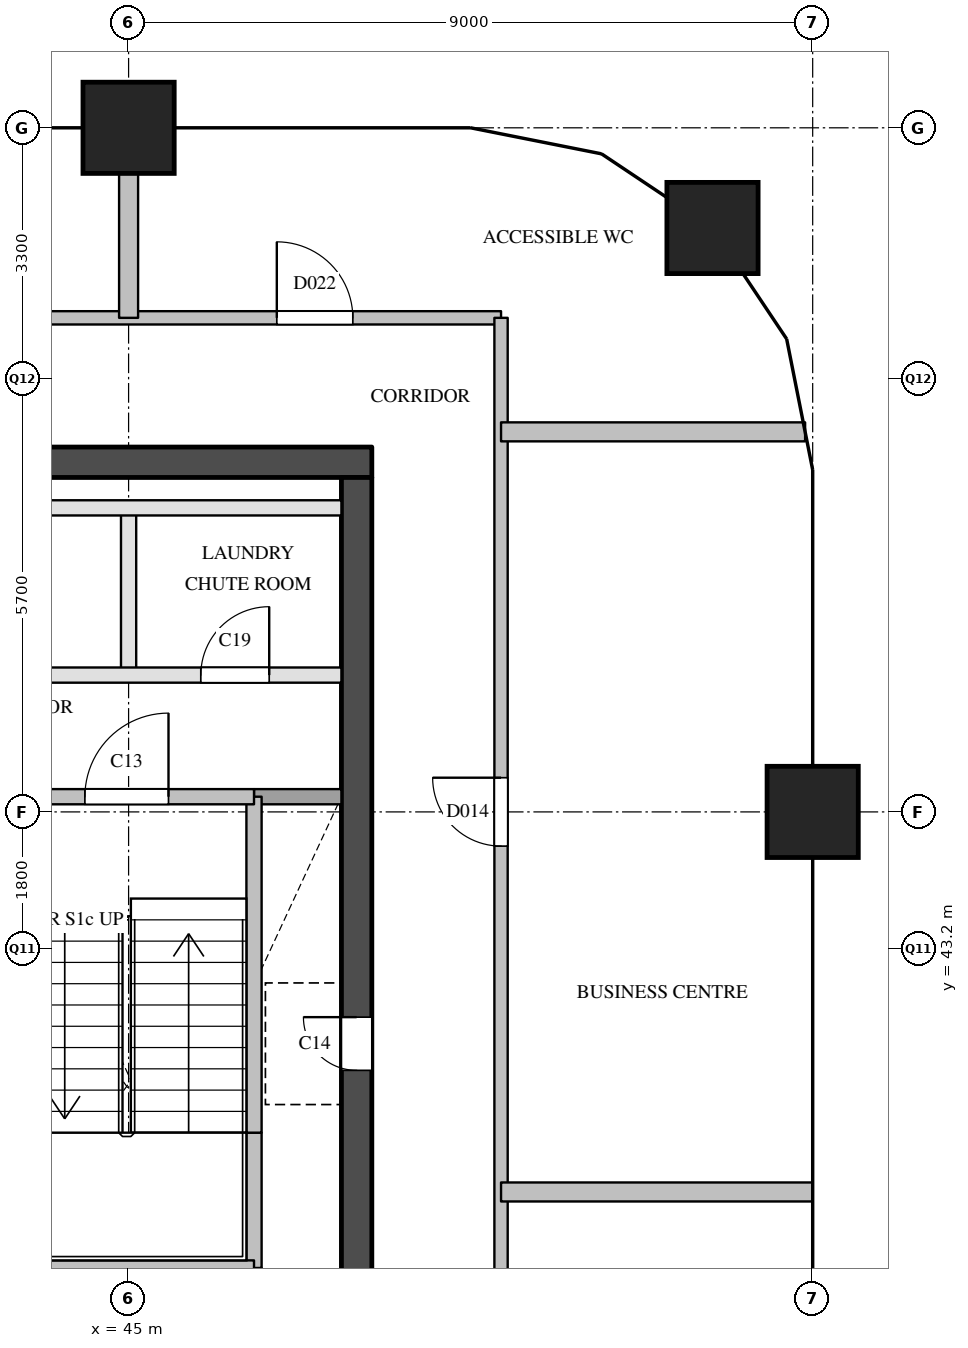
"""IFC4 building model, lengths in metres.
Left out: names, types, materials, properties, quantities, classifications, styles, units other than length and angle.
Written with IfcOpenShell. Run it as: python <this file> out.ifc"""

import sys

from ifc_helpers import new_model, si_unit, direction, frame, frame_2d, origin, origin_2d, place, context, subcontext, project, spatial, rectangle, extrude, element, fill, save


model = new_model("IFC4")
c1 = context("Model", 3, precision=1e-05, world=origin(), true_north=direction((0.0, 1.0)))
c2 = subcontext(c1, "Body", "Model", "MODEL_VIEW")
j1 = project(units=[si_unit("LENGTHUNIT", "METRE"), si_unit("PLANEANGLEUNIT", "RADIAN")], contexts=[c1])
p1 = place(None, origin())
s1 = spatial("IfcSite", under=j1, at=p1, CompositionType="ELEMENT")
p2 = place(p1, origin())
s2 = spatial("IfcBuilding", under=s1, at=p2, CompositionType="ELEMENT")
p3 = place(p2, frame((0.0, 0.0, 238.4)))
s3 = spatial("IfcBuildingStorey", under=s2, at=p3, CompositionType="ELEMENT", Elevation=238.4)
for number, where, z_axis, x_axis in (
    (1, (45.0, 54.0, 0.0), (0.0, 0.0, 1.0), (1.0, 0.0, 0.0)),
    (2, (54.0, 45.0, 0.0), (0.0, 0.0, 1.0), (1.0, 0.0, 0.0)),
    (3, (52.682, 52.682, 0.0), (0.0, 0.0, 1.0), (1.0, 0.0, 0.0)),
):
    element("IfcColumn", number, at=place(p3, frame(where, z_axis=z_axis, x_axis=x_axis)), inside=s3, PredefinedType="COLUMN", context=c2, shape_type="SweptSolid", body=[
        extrude(rectangle(XDim=1.2, YDim=1.2, at=origin_2d()), origin(), (0.0, 0.0, 1.0), 3.9),
    ])
p4 = place(p3, frame((36.2, 49.6, 0.0), z_axis=(0.0, 0.0, 1.0), x_axis=(1.0, 0.0, 0.0)))
e4 = element("IfcWall", 4, at=p4, inside=s3, PredefinedType="SHEAR", context=c2, shape_type="SweptSolid", body=[
    extrude(rectangle(XDim=12.0, YDim=0.4, at=frame_2d((6.0, 0.0))), origin(), (0.0, 0.0, 1.0), 3.6),
])
p5 = place(p3, frame((48.0, 29.1, 0.0), z_axis=(0.0, 0.0, 1.0), x_axis=(0.0, 1.0, 0.0)))
e5 = element("IfcWall", 5, at=p5, inside=s3, PredefinedType="SHEAR", context=c2, shape_type="SweptSolid", body=[
    extrude(rectangle(XDim=20.3, YDim=0.4, at=frame_2d((10.15, 0.0))), origin(), (0.0, 0.0, 1.0), 3.6),
])
p6 = place(p5, frame((12.5, 0.0, 0.0)))
e6 = element("IfcOpeningElement", 6, at=p6, cuts=e5, PredefinedType="OPENING", context=c2, shape_type="SweptSolid", body=[
    extrude(rectangle(XDim=0.7, YDim=2.1, at=frame_2d((0.35, 1.05))), frame((0.0, 0.21, 0.0), z_axis=(0.0, -1.0, 0.0), x_axis=(1.0, 0.0, 0.0)), (0.0, 0.0, 1.0), 0.42),
])
p7 = place(p5, frame((3.9, 0.0, 0.0)))
e7 = element("IfcOpeningElement", 7, at=p7, cuts=e5, PredefinedType="OPENING", context=c2, shape_type="SweptSolid", body=[
    extrude(rectangle(XDim=1.8, YDim=2.1, at=frame_2d((0.9, 1.05))), frame((0.0, 0.21, 0.0), z_axis=(0.0, -1.0, 0.0), x_axis=(1.0, 0.0, 0.0)), (0.0, 0.0, 1.0), 0.42),
])
p8 = place(p3, frame((45.0, 46.8, 0.0), z_axis=(0.0, 0.0, 1.0), x_axis=(0.0, 1.0, 0.0)))
e8 = element("IfcWall", 8, at=p8, inside=s3, PredefinedType="PARTITIONING", context=c2, shape_type="SweptSolid", body=[
    extrude(rectangle(XDim=2.2, YDim=0.2, at=frame_2d((1.1, 0.0))), origin(), (0.0, 0.0, 1.0), 3.6),
])
p9 = place(p3, frame((46.65, 39.0, 0.0), z_axis=(0.0, 0.0, 1.0), x_axis=(0.0, 1.0, 0.0)))
e9 = element("IfcWall", 9, at=p9, inside=s3, PredefinedType="SOLIDWALL", context=c2, shape_type="SweptSolid", body=[
    extrude(rectangle(XDim=1.78, YDim=0.2, at=frame_2d((0.89, 0.0))), origin(), (0.0, 0.0, 1.0), 3.6),
])
p10 = place(p3, frame((46.65, 40.78, 0.0), z_axis=(0.0, 0.0, 1.0), x_axis=(0.0, 1.0, 0.0)))
e10 = element("IfcWall", 10, at=p10, inside=s3, PredefinedType="SOLIDWALL", context=c2, shape_type="SweptSolid", body=[
    extrude(rectangle(XDim=4.42, YDim=0.2, at=frame_2d((2.21, 0.0))), origin(), (0.0, 0.0, 1.0), 3.6),
])
p11 = place(p3, frame((43.4, 39.0, 0.0), z_axis=(0.0, 0.0, 1.0), x_axis=(1.0, 0.0, 0.0)))
e11 = element("IfcWall", 11, at=p11, inside=s3, PredefinedType="SOLIDWALL", context=c2, shape_type="SweptSolid", body=[
    extrude(rectangle(XDim=3.25, YDim=0.2, at=frame_2d((1.625, 0.0))), origin(), (0.0, 0.0, 1.0), 3.6),
])
p12 = place(p3, frame((46.65, 45.2, 0.0), z_axis=(0.0, 0.0, 1.0), x_axis=(1.0, 0.0, 0.0)))
e12 = element("IfcWall", 12, at=p12, inside=s3, PredefinedType="SOLIDWALL", context=c2, shape_type="SweptSolid", body=[
    extrude(rectangle(XDim=1.15, YDim=0.2, at=frame_2d((0.575, 0.0))), origin(), (0.0, 0.0, 1.0), 3.6),
])
p13 = place(p3, frame((36.6, 45.2, 0.0), z_axis=(0.0, 0.0, 1.0), x_axis=(1.0, 0.0, 0.0)))
e13 = element("IfcWall", 13, at=p13, inside=s3, PredefinedType="SOLIDWALL", context=c2, shape_type="SweptSolid", body=[
    extrude(rectangle(XDim=10.05, YDim=0.2, at=frame_2d((5.025, 0.0))), origin(), (0.0, 0.0, 1.0), 3.6),
])
p14 = place(p13, frame((1.125, 0.0, 0.0)))
e14 = element("IfcOpeningElement", 14, at=p14, cuts=e13, PredefinedType="OPENING", context=c2, shape_type="SweptSolid", body=[
    extrude(rectangle(XDim=1.1, YDim=2.1, at=frame_2d((0.55, 1.05))), frame((0.0, 0.11, 0.0), z_axis=(0.0, -1.0, 0.0), x_axis=(1.0, 0.0, 0.0)), (0.0, 0.0, 1.0), 0.22),
])
p15 = place(p13, frame((4.475, 0.0, 0.0)))
e15 = element("IfcOpeningElement", 15, at=p15, cuts=e13, PredefinedType="OPENING", context=c2, shape_type="SweptSolid", body=[
    extrude(rectangle(XDim=1.1, YDim=2.1, at=frame_2d((0.55, 1.05))), frame((0.0, 0.11, 0.0), z_axis=(0.0, -1.0, 0.0), x_axis=(1.0, 0.0, 0.0)), (0.0, 0.0, 1.0), 0.22),
])
p16 = place(p13, frame((7.825, 0.0, 0.0)))
e16 = element("IfcOpeningElement", 16, at=p16, cuts=e13, PredefinedType="OPENING", context=c2, shape_type="SweptSolid", body=[
    extrude(rectangle(XDim=1.1, YDim=2.1, at=frame_2d((0.55, 1.05))), frame((0.0, 0.11, 0.0), z_axis=(0.0, -1.0, 0.0), x_axis=(1.0, 0.0, 0.0)), (0.0, 0.0, 1.0), 0.22),
])
p17 = place(p3, frame((36.6, 46.8, 0.0), z_axis=(0.0, 0.0, 1.0), x_axis=(1.0, 0.0, 0.0)))
e17 = element("IfcWall", 17, at=p17, inside=s3, PredefinedType="PARTITIONING", context=c2, shape_type="SweptSolid", body=[
    extrude(rectangle(XDim=11.2, YDim=0.2, at=frame_2d((5.6, 0.0))), origin(), (0.0, 0.0, 1.0), 3.6),
])
p18 = place(p17, frame((3.75, 0.0, 0.0)))
e18 = element("IfcOpeningElement", 18, at=p18, cuts=e17, PredefinedType="OPENING", context=c2, shape_type="SweptSolid", body=[
    extrude(rectangle(XDim=0.9, YDim=2.1, at=frame_2d((0.45, 1.05))), frame((0.0, 0.11, 0.0), z_axis=(0.0, -1.0, 0.0), x_axis=(1.0, 0.0, 0.0)), (0.0, 0.0, 1.0), 0.22),
])
p19 = place(p17, frame((9.35, 0.0, 0.0)))
e19 = element("IfcOpeningElement", 19, at=p19, cuts=e17, PredefinedType="OPENING", context=c2, shape_type="SweptSolid", body=[
    extrude(rectangle(XDim=0.9, YDim=2.1, at=frame_2d((0.45, 1.05))), frame((0.0, 0.11, 0.0), z_axis=(0.0, -1.0, 0.0), x_axis=(1.0, 0.0, 0.0)), (0.0, 0.0, 1.0), 0.22),
])
p20 = place(p3, frame((36.6, 49.0, 0.0), z_axis=(0.0, 0.0, 1.0), x_axis=(1.0, 0.0, 0.0)))
e20 = element("IfcWall", 20, at=p20, inside=s3, PredefinedType="PARTITIONING", context=c2, shape_type="SweptSolid", body=[
    extrude(rectangle(XDim=11.2, YDim=0.2, at=frame_2d((5.6, 0.0))), origin(), (0.0, 0.0, 1.0), 3.6),
])
p21 = place(p3, frame((34.5, 51.5, 0.0), z_axis=(0.0, 0.0, 1.0), x_axis=(1.0, 0.0, 0.0)))
e21 = element("IfcWall", 21, at=p21, inside=s3, PredefinedType="PARTITIONING", context=c2, shape_type="SweptSolid", body=[
    extrude(rectangle(XDim=15.4, YDim=0.175, at=frame_2d((7.7, 0.0))), origin(), (0.0, 0.0, 1.0), 3.6),
])
p22 = place(p21, frame((12.45, 0.0, 0.0)))
e22 = element("IfcOpeningElement", 22, at=p22, cuts=e21, PredefinedType="OPENING", context=c2, shape_type="SweptSolid", body=[
    extrude(rectangle(XDim=1.0, YDim=2.1, at=frame_2d((0.5, 1.05))), frame((0.0, 0.097, 0.0), z_axis=(0.0, -1.0, 0.0), x_axis=(1.0, 0.0, 0.0)), (0.0, 0.0, 1.0), 0.195),
])
p23 = place(p21, frame((5.05, 0.0, 0.0)))
e23 = element("IfcOpeningElement", 23, at=p23, cuts=e21, PredefinedType="OPENING", context=c2, shape_type="SweptSolid", body=[
    extrude(rectangle(XDim=0.9, YDim=2.1, at=frame_2d((0.45, 1.05))), frame((0.0, 0.097, 0.0), z_axis=(0.0, -1.0, 0.0), x_axis=(1.0, 0.0, 0.0)), (0.0, 0.0, 1.0), 0.195),
])
p24 = place(p3, frame((49.9, 28.5, 0.0), z_axis=(0.0, 0.0, 1.0), x_axis=(0.0, 1.0, 0.0)))
e24 = element("IfcWall", 24, at=p24, inside=s3, PredefinedType="PARTITIONING", context=c2, shape_type="SweptSolid", body=[
    extrude(rectangle(XDim=23.0, YDim=0.175, at=frame_2d((11.5, 0.0))), origin(), (0.0, 0.0, 1.0), 3.6),
])
p25 = place(p24, frame((5.3, 0.0, 0.0)))
e25 = element("IfcOpeningElement", 25, at=p25, cuts=e24, PredefinedType="OPENING", context=c2, shape_type="SweptSolid", body=[
    extrude(rectangle(XDim=0.9, YDim=2.1, at=frame_2d((0.45, 1.05))), frame((0.0, 0.097, 0.0), z_axis=(0.0, -1.0, 0.0), x_axis=(1.0, 0.0, 0.0)), (0.0, 0.0, 1.0), 0.195),
])
p26 = place(p24, frame((16.05, 0.0, 0.0)))
e26 = element("IfcOpeningElement", 26, at=p26, cuts=e24, PredefinedType="OPENING", context=c2, shape_type="SweptSolid", body=[
    extrude(rectangle(XDim=0.9, YDim=2.1, at=frame_2d((0.45, 1.05))), frame((0.0, 0.097, 0.0), z_axis=(0.0, -1.0, 0.0), x_axis=(1.0, 0.0, 0.0)), (0.0, 0.0, 1.0), 0.195),
])
p27 = place(p3, frame((49.9, 40.0, 0.0), z_axis=(0.0, 0.0, 1.0), x_axis=(1.0, 0.0, 0.0)))
e27 = element("IfcWall", 27, at=p27, inside=s3, PredefinedType="PARTITIONING", context=c2, shape_type="SweptSolid", body=[
    extrude(rectangle(XDim=4.1, YDim=0.25, at=frame_2d((2.05, 0.0))), origin(), (0.0, 0.0, 1.0), 2.6),
])
p28 = place(p3, frame((49.9, 50.0, 0.0), z_axis=(0.0, 0.0, 1.0), x_axis=(1.0, 0.0, 0.0)))
e28 = element("IfcWall", 28, at=p28, inside=s3, PredefinedType="PARTITIONING", context=c2, shape_type="SweptSolid", body=[
    extrude(rectangle(XDim=4.0, YDim=0.25, at=frame_2d((2.0, 0.0))), origin(), (0.0, 0.0, 1.0), 2.6),
])
p29 = place(p3, frame((45.0, 51.5, 0.0), z_axis=(0.0, 0.0, 1.0), x_axis=(0.0, 1.0, 0.0)))
e29 = element("IfcWall", 29, at=p29, inside=s3, PredefinedType="PARTITIONING", context=c2, shape_type="SweptSolid", body=[
    extrude(rectangle(XDim=2.5, YDim=0.25, at=frame_2d((1.25, 0.0))), origin(), (0.0, 0.0, 1.0), 3.6),
])
p30 = place(p16, origin())
e30 = element("IfcDoor", 30, at=p30, inside=s3, OperationType="SINGLE_SWING_RIGHT", PredefinedType="DOOR", context=c2, shape_type="SweptSolid", body=[
    extrude(rectangle(XDim=1.1, YDim=2.1, at=frame_2d((0.55, 1.05))), frame((0.0, 0.025, 0.0), z_axis=(0.0, -1.0, 0.0), x_axis=(1.0, 0.0, 0.0)), (0.0, 0.0, 1.0), 0.05),
])
fill(e16, e30)
p31 = place(p6, origin())
e31 = element("IfcDoor", 31, at=p31, inside=s3, OperationType="SINGLE_SWING_RIGHT", PredefinedType="DOOR", context=c2, shape_type="SweptSolid", body=[
    extrude(rectangle(XDim=0.7, YDim=2.1, at=frame_2d((0.35, 1.05))), frame((0.0, 0.025, 0.0), z_axis=(0.0, -1.0, 0.0), x_axis=(1.0, 0.0, 0.0)), (0.0, 0.0, 1.0), 0.05),
])
fill(e6, e31)
p32 = place(p19, origin())
e32 = element("IfcDoor", 32, at=p32, inside=s3, OperationType="SINGLE_SWING_RIGHT", PredefinedType="DOOR", context=c2, shape_type="SweptSolid", body=[
    extrude(rectangle(XDim=0.9, YDim=2.1, at=frame_2d((0.45, 1.05))), frame((0.0, 0.025, 0.0), z_axis=(0.0, -1.0, 0.0), x_axis=(1.0, 0.0, 0.0)), (0.0, 0.0, 1.0), 0.05),
])
fill(e19, e32)
p33 = place(p26, origin())
e33 = element("IfcDoor", 33, at=p33, inside=s3, OperationType="SINGLE_SWING_RIGHT", PredefinedType="DOOR", context=c2, shape_type="SweptSolid", body=[
    extrude(rectangle(XDim=0.9, YDim=2.1, at=frame_2d((0.45, 1.05))), frame((0.0, 0.025, 0.0), z_axis=(0.0, -1.0, 0.0), x_axis=(1.0, 0.0, 0.0)), (0.0, 0.0, 1.0), 0.05),
])
fill(e26, e33)
p34 = place(p22, origin())
e34 = element("IfcDoor", 34, at=p34, inside=s3, OperationType="SINGLE_SWING_LEFT", PredefinedType="DOOR", context=c2, shape_type="SweptSolid", body=[
    extrude(rectangle(XDim=1.0, YDim=2.1, at=frame_2d((0.5, 1.05))), frame((0.0, 0.025, 0.0), z_axis=(0.0, -1.0, 0.0), x_axis=(1.0, 0.0, 0.0)), (0.0, 0.0, 1.0), 0.05),
])
fill(e22, e34)
save(model, sys.argv[1])
